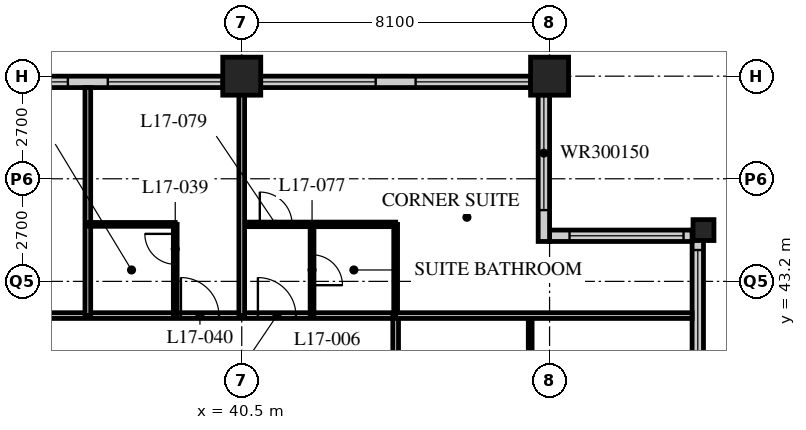
"""IFC4 building model, lengths in metres.
Left out: names, types, materials, properties, quantities, classifications, styles, units other than length and angle.
Written with IfcOpenShell. Run it as: python <this file> out.ifc"""

import sys

from ifc_helpers import new_model, si_unit, direction, frame, frame_2d, origin, origin_2d, place, context, subcontext, project, spatial, rectangle, hollow_rectangle, extrude, element, fill, save


model = new_model("IFC4")
c1 = context("Model", 3, precision=1e-05, world=origin(), true_north=direction((0.0, 1.0)))
c2 = subcontext(c1, "Body", "Model", "MODEL_VIEW")
j1 = project(units=[si_unit("LENGTHUNIT", "METRE"), si_unit("PLANEANGLEUNIT", "RADIAN")], contexts=[c1])
p1 = place(None, origin())
s1 = spatial("IfcSite", under=j1, at=p1, CompositionType="ELEMENT")
p2 = place(p1, origin())
s2 = spatial("IfcBuilding", under=s1, at=p2, CompositionType="ELEMENT")
p3 = place(p2, frame((0.0, 0.0, 70.4)))
s3 = spatial("IfcBuildingStorey", under=s2, at=p3, CompositionType="ELEMENT", Elevation=70.4)
for number, where, z_axis, x_axis in (
    (1, (40.5, 48.6, 0.0), (0.0, 0.0, 1.0), (1.0, 0.0, 0.0)),
    (2, (48.6, 48.6, 0.0), (0.0, 0.0, 1.0), (1.0, 0.0, 0.0)),
):
    element("IfcColumn", number, at=place(p3, frame(where, z_axis=z_axis, x_axis=x_axis)), inside=s3, PredefinedType="COLUMN", context=c2, shape_type="SweptSolid", body=[
        extrude(hollow_rectangle(XDim=1.0, YDim=1.0, WallThickness=0.1, at=origin_2d()), origin(), (0.0, 0.0, 1.0), 3.4),
    ])
p4 = place(p3, frame((52.65, 44.55, 0.0), z_axis=(0.0, 0.0, 1.0), x_axis=(1.0, 0.0, 0.0)))
e3 = element("IfcColumn", 3, at=p4, inside=s3, PredefinedType="COLUMN", context=c2, shape_type="SweptSolid", body=[
    extrude(hollow_rectangle(XDim=0.55, YDim=0.55, WallThickness=0.05, at=origin_2d()), origin(), (0.0, 0.0, 1.0), 3.4),
])
p5 = place(p3, frame((52.5, 40.2, 0.0), z_axis=(0.0, 0.0, 1.0), x_axis=(0.0, 1.0, 0.0)))
e4 = element("IfcWall", 4, at=p5, inside=s3, PredefinedType="SOLIDWALL", context=c2, shape_type="SweptSolid", body=[
    extrude(rectangle(XDim=4.35, YDim=0.3, at=frame_2d((2.175, 0.0))), origin(), (0.0, 0.0, 1.0), 3.19),
])
p6 = place(p5, frame((0.825, 0.0, 0.9)))
e5 = element("IfcOpeningElement", 5, at=p6, cuts=e4, PredefinedType="OPENING", context=c2, shape_type="SweptSolid", body=[
    extrude(rectangle(XDim=3.0, YDim=1.5, at=frame_2d((1.5, 0.75))), frame((0.0, 0.16, 0.0), z_axis=(0.0, -1.0, 0.0), x_axis=(1.0, 0.0, 0.0)), (0.0, 0.0, 1.0), 0.32),
])
p7 = place(p3, frame((52.35, 44.4, 0.0), z_axis=(0.0, 0.0, 1.0), x_axis=(-1.0, 0.0, 0.0)))
e6 = element("IfcWall", 6, at=p7, inside=s3, PredefinedType="SOLIDWALL", context=c2, shape_type="SweptSolid", body=[
    extrude(rectangle(XDim=3.75, YDim=0.3, at=frame_2d((1.875, 0.0))), origin(), (0.0, 0.0, 1.0), 3.19),
])
p8 = place(p7, frame((0.225, 0.0, 0.9)))
e7 = element("IfcOpeningElement", 7, at=p8, cuts=e6, PredefinedType="OPENING", context=c2, shape_type="SweptSolid", body=[
    extrude(rectangle(XDim=3.0, YDim=1.5, at=frame_2d((1.5, 0.75))), frame((0.0, 0.16, 0.0), z_axis=(0.0, -1.0, 0.0), x_axis=(1.0, 0.0, 0.0)), (0.0, 0.0, 1.0), 0.32),
])
p9 = place(p3, frame((48.45, 44.25, 0.0), z_axis=(0.0, 0.0, 1.0), x_axis=(0.0, 1.0, 0.0)))
e8 = element("IfcWall", 8, at=p9, inside=s3, PredefinedType="SOLIDWALL", context=c2, shape_type="SweptSolid", body=[
    extrude(rectangle(XDim=4.35, YDim=0.3, at=frame_2d((2.175, 0.0))), origin(), (0.0, 0.0, 1.0), 3.19),
])
p10 = place(p9, frame((0.825, 0.0, 0.9)))
e9 = element("IfcOpeningElement", 9, at=p10, cuts=e8, PredefinedType="OPENING", context=c2, shape_type="SweptSolid", body=[
    extrude(rectangle(XDim=3.0, YDim=1.5, at=frame_2d((1.5, 0.75))), frame((0.0, 0.16, 0.0), z_axis=(0.0, -1.0, 0.0), x_axis=(1.0, 0.0, 0.0)), (0.0, 0.0, 1.0), 0.32),
])
p11 = place(p3, frame((48.3, 48.45, 0.0), z_axis=(0.0, 0.0, 1.0), x_axis=(-1.0, 0.0, 0.0)))
e10 = element("IfcWall", 10, at=p11, inside=s3, PredefinedType="SOLIDWALL", context=c2, shape_type="SweptSolid", body=[
    extrude(rectangle(XDim=40.2, YDim=0.3, at=frame_2d((20.1, 0.0))), origin(), (0.0, 0.0, 1.0), 3.19),
])
p12 = place(p11, frame((0.225, 0.0, 0.9)))
e11 = element("IfcOpeningElement", 11, at=p12, cuts=e10, PredefinedType="OPENING", context=c2, shape_type="SweptSolid", body=[
    extrude(rectangle(XDim=3.0, YDim=2.0, at=frame_2d((1.5, 1.0))), frame((0.0, 0.16, 0.0), z_axis=(0.0, -1.0, 0.0), x_axis=(1.0, 0.0, 0.0)), (0.0, 0.0, 1.0), 0.32),
])
p13 = place(p11, frame((4.275, 0.0, 0.9)))
e12 = element("IfcOpeningElement", 12, at=p13, cuts=e10, PredefinedType="OPENING", context=c2, shape_type="SweptSolid", body=[
    extrude(rectangle(XDim=3.0, YDim=2.0, at=frame_2d((1.5, 1.0))), frame((0.0, 0.16, 0.0), z_axis=(0.0, -1.0, 0.0), x_axis=(1.0, 0.0, 0.0)), (0.0, 0.0, 1.0), 0.32),
])
p14 = place(p11, frame((8.325, 0.0, 0.9)))
e13 = element("IfcOpeningElement", 13, at=p14, cuts=e10, PredefinedType="OPENING", context=c2, shape_type="SweptSolid", body=[
    extrude(rectangle(XDim=3.0, YDim=2.0, at=frame_2d((1.5, 1.0))), frame((0.0, 0.16, 0.0), z_axis=(0.0, -1.0, 0.0), x_axis=(1.0, 0.0, 0.0)), (0.0, 0.0, 1.0), 0.32),
])
p15 = place(p11, frame((12.375, 0.0, 0.9)))
e14 = element("IfcOpeningElement", 14, at=p15, cuts=e10, PredefinedType="OPENING", context=c2, shape_type="SweptSolid", body=[
    extrude(rectangle(XDim=3.0, YDim=2.0, at=frame_2d((1.5, 1.0))), frame((0.0, 0.16, 0.0), z_axis=(0.0, -1.0, 0.0), x_axis=(1.0, 0.0, 0.0)), (0.0, 0.0, 1.0), 0.32),
])
p16 = place(p11, frame((16.425, 0.0, 0.9)))
e15 = element("IfcOpeningElement", 15, at=p16, cuts=e10, PredefinedType="OPENING", context=c2, shape_type="SweptSolid", body=[
    extrude(rectangle(XDim=3.0, YDim=2.0, at=frame_2d((1.5, 1.0))), frame((0.0, 0.16, 0.0), z_axis=(0.0, -1.0, 0.0), x_axis=(1.0, 0.0, 0.0)), (0.0, 0.0, 1.0), 0.32),
])
p17 = place(p11, frame((20.475, 0.0, 0.9)))
e16 = element("IfcOpeningElement", 16, at=p17, cuts=e10, PredefinedType="OPENING", context=c2, shape_type="SweptSolid", body=[
    extrude(rectangle(XDim=3.0, YDim=2.0, at=frame_2d((1.5, 1.0))), frame((0.0, 0.16, 0.0), z_axis=(0.0, -1.0, 0.0), x_axis=(1.0, 0.0, 0.0)), (0.0, 0.0, 1.0), 0.32),
])
p18 = place(p11, frame((24.525, 0.0, 0.9)))
e17 = element("IfcOpeningElement", 17, at=p18, cuts=e10, PredefinedType="OPENING", context=c2, shape_type="SweptSolid", body=[
    extrude(rectangle(XDim=3.0, YDim=2.0, at=frame_2d((1.5, 1.0))), frame((0.0, 0.16, 0.0), z_axis=(0.0, -1.0, 0.0), x_axis=(1.0, 0.0, 0.0)), (0.0, 0.0, 1.0), 0.32),
])
p19 = place(p11, frame((28.575, 0.0, 0.9)))
e18 = element("IfcOpeningElement", 18, at=p19, cuts=e10, PredefinedType="OPENING", context=c2, shape_type="SweptSolid", body=[
    extrude(rectangle(XDim=3.0, YDim=2.0, at=frame_2d((1.5, 1.0))), frame((0.0, 0.16, 0.0), z_axis=(0.0, -1.0, 0.0), x_axis=(1.0, 0.0, 0.0)), (0.0, 0.0, 1.0), 0.32),
])
p20 = place(p11, frame((32.625, 0.0, 0.9)))
e19 = element("IfcOpeningElement", 19, at=p20, cuts=e10, PredefinedType="OPENING", context=c2, shape_type="SweptSolid", body=[
    extrude(rectangle(XDim=3.0, YDim=2.0, at=frame_2d((1.5, 1.0))), frame((0.0, 0.16, 0.0), z_axis=(0.0, -1.0, 0.0), x_axis=(1.0, 0.0, 0.0)), (0.0, 0.0, 1.0), 0.32),
])
p21 = place(p11, frame((36.675, 0.0, 0.9)))
e20 = element("IfcOpeningElement", 20, at=p21, cuts=e10, PredefinedType="OPENING", context=c2, shape_type="SweptSolid", body=[
    extrude(rectangle(XDim=3.0, YDim=2.0, at=frame_2d((1.5, 1.0))), frame((0.0, 0.16, 0.0), z_axis=(0.0, -1.0, 0.0), x_axis=(1.0, 0.0, 0.0)), (0.0, 0.0, 1.0), 0.32),
])
p22 = place(p3, frame((8.1, 42.3, 0.0), z_axis=(0.0, 0.0, 1.0), x_axis=(1.0, 0.0, 0.0)))
e21 = element("IfcWall", 21, at=p22, inside=s3, PredefinedType="PARTITIONING", context=c2, shape_type="SweptSolid", body=[
    extrude(rectangle(XDim=36.45, YDim=0.15, at=frame_2d((18.225, 0.0))), origin(), (0.0, 0.0, 1.0), 3.19),
])
p23 = place(p22, frame((9.5, 0.0, 0.0)))
e22 = element("IfcOpeningElement", 22, at=p23, cuts=e21, PredefinedType="OPENING", context=c2, shape_type="SweptSolid", body=[
    extrude(rectangle(XDim=1.0, YDim=2.1, at=frame_2d((0.5, 1.05))), frame((0.0, 0.085, 0.0), z_axis=(0.0, -1.0, 0.0), x_axis=(1.0, 0.0, 0.0)), (0.0, 0.0, 1.0), 0.17),
])
p24 = place(p22, frame((14.6, 0.0, 0.0)))
e23 = element("IfcOpeningElement", 23, at=p24, cuts=e21, PredefinedType="OPENING", context=c2, shape_type="SweptSolid", body=[
    extrude(rectangle(XDim=1.0, YDim=2.1, at=frame_2d((0.5, 1.05))), frame((0.0, 0.085, 0.0), z_axis=(0.0, -1.0, 0.0), x_axis=(1.0, 0.0, 0.0)), (0.0, 0.0, 1.0), 0.17),
])
p25 = place(p22, frame((18.65, 0.0, 0.0)))
e24 = element("IfcOpeningElement", 24, at=p25, cuts=e21, PredefinedType="OPENING", context=c2, shape_type="SweptSolid", body=[
    extrude(rectangle(XDim=1.0, YDim=2.1, at=frame_2d((0.5, 1.05))), frame((0.0, 0.085, 0.0), z_axis=(0.0, -1.0, 0.0), x_axis=(1.0, 0.0, 0.0)), (0.0, 0.0, 1.0), 0.17),
])
p26 = place(p22, frame((25.7, 0.0, 0.0)))
e25 = element("IfcOpeningElement", 25, at=p26, cuts=e21, PredefinedType="OPENING", context=c2, shape_type="SweptSolid", body=[
    extrude(rectangle(XDim=1.0, YDim=2.1, at=frame_2d((0.5, 1.05))), frame((0.0, 0.085, 0.0), z_axis=(0.0, -1.0, 0.0), x_axis=(1.0, 0.0, 0.0)), (0.0, 0.0, 1.0), 0.17),
])
p27 = place(p22, frame((30.8, 0.0, 0.0)))
e26 = element("IfcOpeningElement", 26, at=p27, cuts=e21, PredefinedType="OPENING", context=c2, shape_type="SweptSolid", body=[
    extrude(rectangle(XDim=1.0, YDim=2.1, at=frame_2d((0.5, 1.05))), frame((0.0, 0.085, 0.0), z_axis=(0.0, -1.0, 0.0), x_axis=(1.0, 0.0, 0.0)), (0.0, 0.0, 1.0), 0.17),
])
p28 = place(p22, frame((32.825, 0.0, 0.0)))
e27 = element("IfcOpeningElement", 27, at=p28, cuts=e21, PredefinedType="OPENING", context=c2, shape_type="SweptSolid", body=[
    extrude(rectangle(XDim=1.0, YDim=2.1, at=frame_2d((0.5, 1.05))), frame((0.0, 0.085, 0.0), z_axis=(0.0, -1.0, 0.0), x_axis=(1.0, 0.0, 0.0)), (0.0, 0.0, 1.0), 0.17),
])
p29 = place(p22, frame((2.625, 0.0, 0.0)))
e28 = element("IfcOpeningElement", 28, at=p29, cuts=e21, PredefinedType="OPENING", context=c2, shape_type="SweptSolid", body=[
    extrude(rectangle(XDim=1.0, YDim=2.1, at=frame_2d((0.5, 1.05))), frame((0.0, 0.085, 0.0), z_axis=(0.0, -1.0, 0.0), x_axis=(1.0, 0.0, 0.0)), (0.0, 0.0, 1.0), 0.17),
])
p30 = place(p3, frame((44.55, 12.15, 0.0), z_axis=(0.0, 0.0, 1.0), x_axis=(0.0, 1.0, 0.0)))
e29 = element("IfcWall", 29, at=p30, inside=s3, PredefinedType="PARTITIONING", context=c2, shape_type="SweptSolid", body=[
    extrude(rectangle(XDim=30.15, YDim=0.15, at=frame_2d((15.075, 0.0))), origin(), (0.0, 0.0, 1.0), 3.19),
])
p31 = place(p30, frame((2.45, 0.0, 0.0)))
e30 = element("IfcOpeningElement", 30, at=p31, cuts=e29, PredefinedType="OPENING", context=c2, shape_type="SweptSolid", body=[
    extrude(rectangle(XDim=1.0, YDim=2.1, at=frame_2d((0.5, 1.05))), frame((0.0, 0.085, 0.0), z_axis=(0.0, -1.0, 0.0), x_axis=(1.0, 0.0, 0.0)), (0.0, 0.0, 1.0), 0.17),
])
p32 = place(p30, frame((4.35, 0.0, 0.0)))
e31 = element("IfcOpeningElement", 31, at=p32, cuts=e29, PredefinedType="OPENING", context=c2, shape_type="SweptSolid", body=[
    extrude(rectangle(XDim=1.0, YDim=2.1, at=frame_2d((0.5, 1.05))), frame((0.0, 0.085, 0.0), z_axis=(0.0, -1.0, 0.0), x_axis=(1.0, 0.0, 0.0)), (0.0, 0.0, 1.0), 0.17),
])
p33 = place(p30, frame((8.4, 0.0, 0.0)))
e32 = element("IfcOpeningElement", 32, at=p33, cuts=e29, PredefinedType="OPENING", context=c2, shape_type="SweptSolid", body=[
    extrude(rectangle(XDim=1.0, YDim=2.1, at=frame_2d((0.5, 1.05))), frame((0.0, 0.085, 0.0), z_axis=(0.0, -1.0, 0.0), x_axis=(1.0, 0.0, 0.0)), (0.0, 0.0, 1.0), 0.17),
])
p34 = place(p30, frame((14.6, 0.0, 0.0)))
e33 = element("IfcOpeningElement", 33, at=p34, cuts=e29, PredefinedType="OPENING", context=c2, shape_type="SweptSolid", body=[
    extrude(rectangle(XDim=1.0, YDim=2.1, at=frame_2d((0.5, 1.05))), frame((0.0, 0.085, 0.0), z_axis=(0.0, -1.0, 0.0), x_axis=(1.0, 0.0, 0.0)), (0.0, 0.0, 1.0), 0.17),
])
p35 = place(p30, frame((21.65, 0.0, 0.0)))
e34 = element("IfcOpeningElement", 34, at=p35, cuts=e29, PredefinedType="OPENING", context=c2, shape_type="SweptSolid", body=[
    extrude(rectangle(XDim=1.0, YDim=2.1, at=frame_2d((0.5, 1.05))), frame((0.0, 0.085, 0.0), z_axis=(0.0, -1.0, 0.0), x_axis=(1.0, 0.0, 0.0)), (0.0, 0.0, 1.0), 0.17),
])
p36 = place(p30, frame((26.7, 0.0, 0.0)))
e35 = element("IfcOpeningElement", 35, at=p36, cuts=e29, PredefinedType="OPENING", context=c2, shape_type="SweptSolid", body=[
    extrude(rectangle(XDim=1.0, YDim=2.1, at=frame_2d((0.5, 1.05))), frame((0.0, 0.085, 0.0), z_axis=(0.0, -1.0, 0.0), x_axis=(1.0, 0.0, 0.0)), (0.0, 0.0, 1.0), 0.17),
])
p37 = place(p3, frame((36.45, 42.3, 0.0), z_axis=(0.0, 0.0, 1.0), x_axis=(0.0, 1.0, 0.0)))
e36 = element("IfcWall", 36, at=p37, inside=s3, PredefinedType="PARTITIONING", context=c2, shape_type="SweptSolid", body=[
    extrude(rectangle(XDim=6.0, YDim=0.15, at=frame_2d((3.0, 0.0))), origin(), (0.0, 0.0, 1.0), 3.19),
])
p38 = place(p3, frame((36.45, 44.7, 0.0), z_axis=(0.0, 0.0, 1.0), x_axis=(1.0, 0.0, 0.0)))
e37 = element("IfcWall", 37, at=p38, inside=s3, PredefinedType="PARTITIONING", context=c2, shape_type="SweptSolid", body=[
    extrude(rectangle(XDim=2.3, YDim=0.1, at=frame_2d((1.15, 0.0))), origin(), (0.0, 0.0, 1.0), 3.19),
])
p39 = place(p3, frame((38.75, 42.3, 0.0), z_axis=(0.0, 0.0, 1.0), x_axis=(0.0, 1.0, 0.0)))
e38 = element("IfcWall", 38, at=p39, inside=s3, PredefinedType="PARTITIONING", context=c2, shape_type="SweptSolid", body=[
    extrude(rectangle(XDim=2.4, YDim=0.1, at=frame_2d((1.2, 0.0))), origin(), (0.0, 0.0, 1.0), 3.19),
])
p40 = place(p39, frame((1.35, 0.0, 0.0)))
e39 = element("IfcOpeningElement", 39, at=p40, cuts=e38, PredefinedType="OPENING", context=c2, shape_type="SweptSolid", body=[
    extrude(rectangle(XDim=0.8, YDim=2.1, at=frame_2d((0.4, 1.05))), frame((0.0, 0.06, 0.0), z_axis=(0.0, -1.0, 0.0), x_axis=(1.0, 0.0, 0.0)), (0.0, 0.0, 1.0), 0.12),
])
p41 = place(p3, frame((48.09, 40.0, 0.0), z_axis=(0.0, 0.0, 1.0), x_axis=(0.0, 1.0, 0.0)))
e40 = element("IfcWall", 40, at=p41, inside=s3, PredefinedType="PARTITIONING", context=c2, shape_type="SweptSolid", body=[
    extrude(rectangle(XDim=2.3, YDim=0.1, at=frame_2d((1.15, 0.0))), origin(), (0.0, 0.0, 1.0), 3.19),
])
p42 = place(p3, frame((40.5, 44.7, 0.0), z_axis=(0.0, 0.0, 1.0), x_axis=(1.0, 0.0, 0.0)))
e41 = element("IfcWall", 41, at=p42, inside=s3, PredefinedType="PARTITIONING", context=c2, shape_type="SweptSolid", body=[
    extrude(rectangle(XDim=4.05, YDim=0.12, at=frame_2d((2.025, 0.0))), origin(), (0.0, 0.0, 1.0), 3.19),
])
p43 = place(p42, frame((0.475, 0.0, 0.0)))
e42 = element("IfcOpeningElement", 42, at=p43, cuts=e41, PredefinedType="OPENING", context=c2, shape_type="SweptSolid", body=[
    extrude(rectangle(XDim=0.85, YDim=2.1, at=frame_2d((0.425, 1.05))), frame((0.0, 0.07, 0.0), z_axis=(0.0, -1.0, 0.0), x_axis=(1.0, 0.0, 0.0)), (0.0, 0.0, 1.0), 0.14),
])
p44 = place(p3, frame((42.35, 42.3, 0.0), z_axis=(0.0, 0.0, 1.0), x_axis=(0.0, 1.0, 0.0)))
e43 = element("IfcWall", 43, at=p44, inside=s3, PredefinedType="PARTITIONING", context=c2, shape_type="SweptSolid", body=[
    extrude(rectangle(XDim=2.4, YDim=0.1, at=frame_2d((1.2, 0.0))), origin(), (0.0, 0.0, 1.0), 3.19),
])
p45 = place(p44, frame((0.8, 0.0, 0.0)))
e44 = element("IfcOpeningElement", 44, at=p45, cuts=e43, PredefinedType="OPENING", context=c2, shape_type="SweptSolid", body=[
    extrude(rectangle(XDim=0.8, YDim=2.1, at=frame_2d((0.4, 1.05))), frame((0.0, 0.06, 0.0), z_axis=(0.0, -1.0, 0.0), x_axis=(1.0, 0.0, 0.0)), (0.0, 0.0, 1.0), 0.12),
])
p46 = place(p3, frame((44.55, 42.3, 0.0), z_axis=(0.0, 0.0, 1.0), x_axis=(0.0, 1.0, 0.0)))
e45 = element("IfcWall", 45, at=p46, inside=s3, PredefinedType="PARTITIONING", context=c2, shape_type="SweptSolid", body=[
    extrude(rectangle(XDim=2.4, YDim=0.1, at=frame_2d((1.2, 0.0))), origin(), (0.0, 0.0, 1.0), 3.19),
])
p47 = place(p3, frame((44.55, 42.3, 0.0), z_axis=(0.0, 0.0, 1.0), x_axis=(1.0, 0.0, 0.0)))
e46 = element("IfcWall", 46, at=p47, inside=s3, PredefinedType="PARTITIONING", context=c2, shape_type="SweptSolid", body=[
    extrude(rectangle(XDim=7.8, YDim=0.15, at=frame_2d((3.9, 0.0))), origin(), (0.0, 0.0, 1.0), 3.19),
])
p48 = place(p3, frame((40.5, 42.3, 0.0), z_axis=(0.0, 0.0, 1.0), x_axis=(0.0, 1.0, 0.0)))
e47 = element("IfcWall", 47, at=p48, inside=s3, PredefinedType="PARTITIONING", context=c2, shape_type="SweptSolid", body=[
    extrude(rectangle(XDim=6.0, YDim=0.15, at=frame_2d((3.0, 0.0))), origin(), (0.0, 0.0, 1.0), 2.578),
])
p49 = place(p6, origin())
e48 = element("IfcWindow", 48, at=p49, inside=s3, PartitioningType="SINGLE_PANEL", PredefinedType="WINDOW", context=c2, shape_type="SweptSolid", body=[
    extrude(rectangle(XDim=3.0, YDim=1.5, at=frame_2d((1.5, 0.75))), frame((0.0, 0.03, 0.0), z_axis=(0.0, -1.0, 0.0), x_axis=(1.0, 0.0, 0.0)), (0.0, 0.0, 1.0), 0.06),
])
fill(e5, e48)
p50 = place(p8, origin())
e49 = element("IfcWindow", 49, at=p50, inside=s3, PartitioningType="SINGLE_PANEL", PredefinedType="WINDOW", context=c2, shape_type="SweptSolid", body=[
    extrude(rectangle(XDim=3.0, YDim=1.5, at=frame_2d((1.5, 0.75))), frame((0.0, 0.03, 0.0), z_axis=(0.0, -1.0, 0.0), x_axis=(1.0, 0.0, 0.0)), (0.0, 0.0, 1.0), 0.06),
])
fill(e7, e49)
p51 = place(p10, origin())
e50 = element("IfcWindow", 50, at=p51, inside=s3, PartitioningType="SINGLE_PANEL", PredefinedType="WINDOW", context=c2, shape_type="SweptSolid", body=[
    extrude(rectangle(XDim=3.0, YDim=1.5, at=frame_2d((1.5, 0.75))), frame((0.0, 0.03, 0.0), z_axis=(0.0, -1.0, 0.0), x_axis=(1.0, 0.0, 0.0)), (0.0, 0.0, 1.0), 0.06),
])
fill(e9, e50)
p52 = place(p12, origin())
e51 = element("IfcWindow", 51, at=p52, inside=s3, PartitioningType="SINGLE_PANEL", PredefinedType="WINDOW", context=c2, shape_type="SweptSolid", body=[
    extrude(rectangle(XDim=3.0, YDim=2.0, at=frame_2d((1.5, 1.0))), frame((0.0, 0.03, 0.0), z_axis=(0.0, -1.0, 0.0), x_axis=(1.0, 0.0, 0.0)), (0.0, 0.0, 1.0), 0.06),
])
fill(e11, e51)
p53 = place(p13, origin())
e52 = element("IfcWindow", 52, at=p53, inside=s3, PartitioningType="SINGLE_PANEL", PredefinedType="WINDOW", context=c2, shape_type="SweptSolid", body=[
    extrude(rectangle(XDim=3.0, YDim=2.0, at=frame_2d((1.5, 1.0))), frame((0.0, 0.03, 0.0), z_axis=(0.0, -1.0, 0.0), x_axis=(1.0, 0.0, 0.0)), (0.0, 0.0, 1.0), 0.06),
])
fill(e12, e52)
p54 = place(p14, origin())
e53 = element("IfcWindow", 53, at=p54, inside=s3, PartitioningType="SINGLE_PANEL", PredefinedType="WINDOW", context=c2, shape_type="SweptSolid", body=[
    extrude(rectangle(XDim=3.0, YDim=2.0, at=frame_2d((1.5, 1.0))), frame((0.0, 0.03, 0.0), z_axis=(0.0, -1.0, 0.0), x_axis=(1.0, 0.0, 0.0)), (0.0, 0.0, 1.0), 0.06),
])
fill(e13, e53)
p55 = place(p15, origin())
e54 = element("IfcWindow", 54, at=p55, inside=s3, PartitioningType="SINGLE_PANEL", PredefinedType="WINDOW", context=c2, shape_type="SweptSolid", body=[
    extrude(rectangle(XDim=3.0, YDim=2.0, at=frame_2d((1.5, 1.0))), frame((0.0, 0.03, 0.0), z_axis=(0.0, -1.0, 0.0), x_axis=(1.0, 0.0, 0.0)), (0.0, 0.0, 1.0), 0.06),
])
fill(e14, e54)
p56 = place(p40, origin())
e55 = element("IfcDoor", 55, at=p56, inside=s3, OperationType="SINGLE_SWING_RIGHT", PredefinedType="DOOR", context=c2, shape_type="SweptSolid", body=[
    extrude(rectangle(XDim=0.8, YDim=2.1, at=frame_2d((0.4, 1.05))), frame((0.0, 0.025, 0.0), z_axis=(0.0, -1.0, 0.0), x_axis=(1.0, 0.0, 0.0)), (0.0, 0.0, 1.0), 0.05),
])
fill(e39, e55)
p57 = place(p27, origin())
e56 = element("IfcDoor", 56, at=p57, inside=s3, OperationType="SINGLE_SWING_LEFT", PredefinedType="DOOR", context=c2, shape_type="SweptSolid", body=[
    extrude(rectangle(XDim=1.0, YDim=2.1, at=frame_2d((0.5, 1.05))), frame((0.0, 0.025, 0.0), z_axis=(0.0, -1.0, 0.0), x_axis=(1.0, 0.0, 0.0)), (0.0, 0.0, 1.0), 0.05),
])
fill(e26, e56)
p58 = place(p45, origin())
e57 = element("IfcDoor", 57, at=p58, inside=s3, OperationType="SINGLE_SWING_RIGHT", PredefinedType="DOOR", context=c2, shape_type="SweptSolid", body=[
    extrude(rectangle(XDim=0.8, YDim=2.1, at=frame_2d((0.4, 1.05))), frame((0.0, 0.025, 0.0), z_axis=(0.0, -1.0, 0.0), x_axis=(1.0, 0.0, 0.0)), (0.0, 0.0, 1.0), 0.05),
])
fill(e44, e57)
p59 = place(p28, origin())
e58 = element("IfcDoor", 58, at=p59, inside=s3, OperationType="SINGLE_SWING_LEFT", PredefinedType="DOOR", context=c2, shape_type="SweptSolid", body=[
    extrude(rectangle(XDim=1.0, YDim=2.1, at=frame_2d((0.5, 1.05))), frame((0.0, 0.025, 0.0), z_axis=(0.0, -1.0, 0.0), x_axis=(1.0, 0.0, 0.0)), (0.0, 0.0, 1.0), 0.05),
])
fill(e27, e58)
p60 = place(p43, origin())
e59 = element("IfcDoor", 59, at=p60, inside=s3, OperationType="SINGLE_SWING_LEFT", PredefinedType="DOOR", context=c2, shape_type="SweptSolid", body=[
    extrude(rectangle(XDim=0.85, YDim=2.1, at=frame_2d((0.425, 1.05))), frame((0.0, 0.025, 0.0), z_axis=(0.0, -1.0, 0.0), x_axis=(1.0, 0.0, 0.0)), (0.0, 0.0, 1.0), 0.05),
])
fill(e42, e59)
save(model, sys.argv[1])
